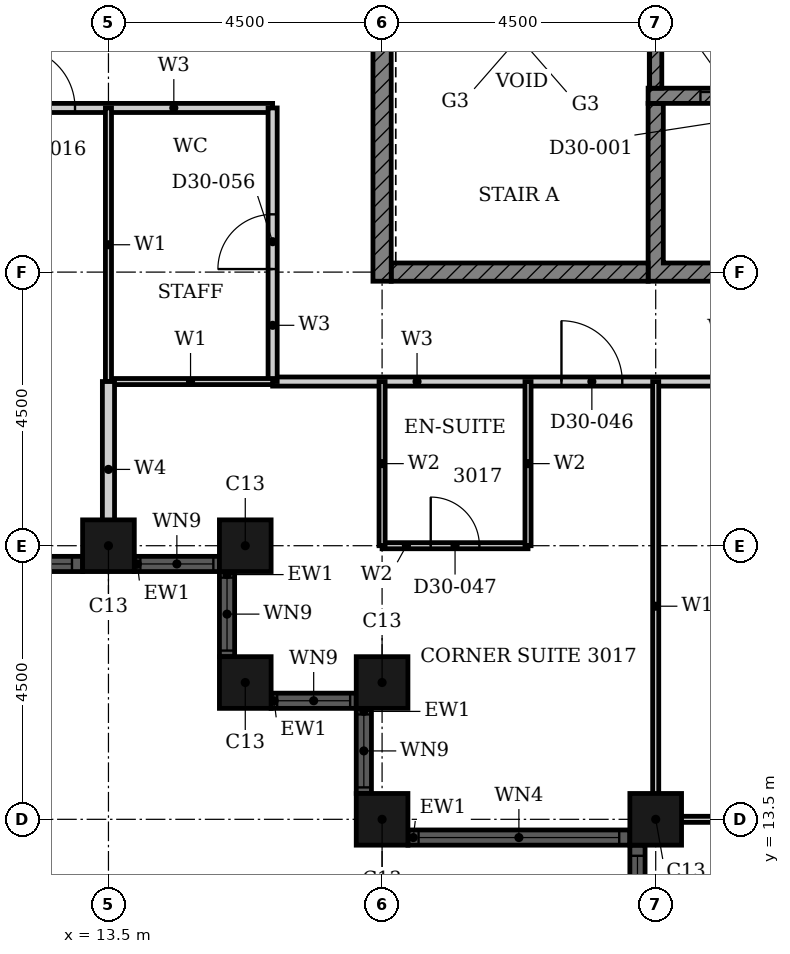
"""IFC4 building model, lengths in metres.
Left out: names, types, materials, properties, quantities, classifications, styles, units other than length and angle.
Written with IfcOpenShell. Run it as: python <this file> out.ifc"""

import sys

from ifc_helpers import new_model, si_unit, direction, frame, frame_2d, origin, origin_2d, place, context, subcontext, project, spatial, polyline, rectangle, hollow_rectangle, outline, extrude, element, fill, save


model = new_model("IFC4")
c1 = context("Model", 3, precision=1e-05, world=origin(), true_north=direction((0.0, 1.0)))
c2 = subcontext(c1, "Body", "Model", "MODEL_VIEW")
j1 = project(units=[si_unit("LENGTHUNIT", "METRE"), si_unit("PLANEANGLEUNIT", "RADIAN")], contexts=[c1])
p1 = place(None, origin())
s1 = spatial("IfcSite", under=j1, at=p1, CompositionType="ELEMENT")
p2 = place(p1, origin())
s2 = spatial("IfcBuilding", under=s1, at=p2, CompositionType="ELEMENT")
p3 = place(p2, frame((0.0, 0.0, 122.4)))
s3 = spatial("IfcBuildingStorey", under=s2, at=p3, CompositionType="ELEMENT", Elevation=122.4)
for number, where, z_axis, x_axis in (
    (1, (13.5, 18.0, 0.0), (0.0, 0.0, 1.0), (1.0, 0.0, 0.0)),
    (2, (15.75, 18.0, 0.0), (0.0, 0.0, 1.0), (1.0, 0.0, 0.0)),
    (3, (15.75, 15.75, 0.0), (0.0, 0.0, 1.0), (1.0, 0.0, 0.0)),
    (4, (18.0, 15.75, 0.0), (0.0, 0.0, 1.0), (1.0, 0.0, 0.0)),
    (5, (18.0, 13.5, 0.0), (0.0, 0.0, 1.0), (1.0, 0.0, 0.0)),
    (6, (22.5, 13.5, 0.0), (0.0, 0.0, 1.0), (1.0, 0.0, 0.0)),
):
    element("IfcColumn", number, at=place(p3, frame(where, z_axis=z_axis, x_axis=x_axis)), inside=s3, PredefinedType="COLUMN", context=c2, shape_type="SweptSolid", body=[
        extrude(hollow_rectangle(XDim=0.85, YDim=0.85, WallThickness=0.026, at=origin_2d()), origin(), (0.0, 0.0, 1.0), 3.6),
    ])
p4 = place(p3, frame((4.925, 17.7, 0.0), z_axis=(0.0, 0.0, 1.0), x_axis=(1.0, 0.0, 0.0)))
e7 = element("IfcWall", 7, at=p4, inside=s3, PredefinedType="SOLIDWALL", context=c2, shape_type="SweptSolid", body=[
    extrude(rectangle(XDim=8.15, YDim=0.25, at=frame_2d((4.075, 0.0))), origin(), (0.0, 0.0, 1.0), 3.6),
])
p5 = place(p4, frame((0.175, 0.0, 0.9)))
e8 = element("IfcOpeningElement", 8, at=p5, cuts=e7, PredefinedType="OPENING", context=c2, shape_type="SweptSolid", body=[
    extrude(rectangle(XDim=3.3, YDim=2.08, at=frame_2d((1.65, 1.04))), frame((0.0, 0.135, 0.0), z_axis=(0.0, -1.0, 0.0), x_axis=(1.0, 0.0, 0.0)), (0.0, 0.0, 1.0), 0.27),
])
p6 = place(p4, frame((4.675, 0.0, 0.9)))
e9 = element("IfcOpeningElement", 9, at=p6, cuts=e7, PredefinedType="OPENING", context=c2, shape_type="SweptSolid", body=[
    extrude(rectangle(XDim=3.3, YDim=2.08, at=frame_2d((1.65, 1.04))), frame((0.0, 0.135, 0.0), z_axis=(0.0, -1.0, 0.0), x_axis=(1.0, 0.0, 0.0)), (0.0, 0.0, 1.0), 0.27),
])
p7 = place(p3, frame((13.925, 17.7, 0.0), z_axis=(0.0, 0.0, 1.0), x_axis=(1.0, 0.0, 0.0)))
e10 = element("IfcWall", 10, at=p7, inside=s3, PredefinedType="SOLIDWALL", context=c2, shape_type="SweptSolid", body=[
    extrude(rectangle(XDim=1.4, YDim=0.25, at=frame_2d((0.7, 0.0))), origin(), (0.0, 0.0, 1.0), 3.6),
])
p8 = place(p7, frame((0.1, 0.0, 0.9)))
e11 = element("IfcOpeningElement", 11, at=p8, cuts=e10, PredefinedType="OPENING", context=c2, shape_type="SweptSolid", body=[
    extrude(rectangle(XDim=1.2, YDim=2.08, at=frame_2d((0.6, 1.04))), frame((0.0, 0.135, 0.0), z_axis=(0.0, -1.0, 0.0), x_axis=(1.0, 0.0, 0.0)), (0.0, 0.0, 1.0), 0.27),
])
p9 = place(p3, frame((15.45, 17.575, 0.0), z_axis=(0.0, 0.0, 1.0), x_axis=(0.0, -1.0, 0.0)))
e12 = element("IfcWall", 12, at=p9, inside=s3, PredefinedType="SOLIDWALL", context=c2, shape_type="SweptSolid", body=[
    extrude(rectangle(XDim=1.4, YDim=0.25, at=frame_2d((0.7, 0.0))), origin(), (0.0, 0.0, 1.0), 3.6),
])
p10 = place(p9, frame((0.1, 0.0, 0.9)))
e13 = element("IfcOpeningElement", 13, at=p10, cuts=e12, PredefinedType="OPENING", context=c2, shape_type="SweptSolid", body=[
    extrude(rectangle(XDim=1.2, YDim=2.08, at=frame_2d((0.6, 1.04))), frame((0.0, 0.135, 0.0), z_axis=(0.0, -1.0, 0.0), x_axis=(1.0, 0.0, 0.0)), (0.0, 0.0, 1.0), 0.27),
])
p11 = place(p3, frame((16.175, 15.45, 0.0), z_axis=(0.0, 0.0, 1.0), x_axis=(1.0, 0.0, 0.0)))
e14 = element("IfcWall", 14, at=p11, inside=s3, PredefinedType="SOLIDWALL", context=c2, shape_type="SweptSolid", body=[
    extrude(rectangle(XDim=1.4, YDim=0.25, at=frame_2d((0.7, 0.0))), origin(), (0.0, 0.0, 1.0), 3.6),
])
p12 = place(p11, frame((0.1, 0.0, 0.9)))
e15 = element("IfcOpeningElement", 15, at=p12, cuts=e14, PredefinedType="OPENING", context=c2, shape_type="SweptSolid", body=[
    extrude(rectangle(XDim=1.2, YDim=2.08, at=frame_2d((0.6, 1.04))), frame((0.0, 0.135, 0.0), z_axis=(0.0, -1.0, 0.0), x_axis=(1.0, 0.0, 0.0)), (0.0, 0.0, 1.0), 0.27),
])
p13 = place(p3, frame((17.7, 15.325, 0.0), z_axis=(0.0, 0.0, 1.0), x_axis=(0.0, -1.0, 0.0)))
e16 = element("IfcWall", 16, at=p13, inside=s3, PredefinedType="SOLIDWALL", context=c2, shape_type="SweptSolid", body=[
    extrude(rectangle(XDim=1.4, YDim=0.25, at=frame_2d((0.7, 0.0))), origin(), (0.0, 0.0, 1.0), 3.6),
])
p14 = place(p13, frame((0.1, 0.0, 0.9)))
e17 = element("IfcOpeningElement", 17, at=p14, cuts=e16, PredefinedType="OPENING", context=c2, shape_type="SweptSolid", body=[
    extrude(rectangle(XDim=1.2, YDim=2.08, at=frame_2d((0.6, 1.04))), frame((0.0, 0.135, 0.0), z_axis=(0.0, -1.0, 0.0), x_axis=(1.0, 0.0, 0.0)), (0.0, 0.0, 1.0), 0.27),
])
p15 = place(p3, frame((18.425, 13.2, 0.0), z_axis=(0.0, 0.0, 1.0), x_axis=(1.0, 0.0, 0.0)))
e18 = element("IfcWall", 18, at=p15, inside=s3, PredefinedType="SOLIDWALL", context=c2, shape_type="SweptSolid", body=[
    extrude(rectangle(XDim=3.65, YDim=0.25, at=frame_2d((1.825, 0.0))), origin(), (0.0, 0.0, 1.0), 3.6),
])
p16 = place(p15, frame((0.175, 0.0, 0.9)))
e19 = element("IfcOpeningElement", 19, at=p16, cuts=e18, PredefinedType="OPENING", context=c2, shape_type="SweptSolid", body=[
    extrude(rectangle(XDim=3.3, YDim=2.08, at=frame_2d((1.65, 1.04))), frame((0.0, 0.135, 0.0), z_axis=(0.0, -1.0, 0.0), x_axis=(1.0, 0.0, 0.0)), (0.0, 0.0, 1.0), 0.27),
])
p17 = place(p3, frame((22.2, 13.075, 0.0), z_axis=(0.0, 0.0, 1.0), x_axis=(0.0, -1.0, 0.0)))
e20 = element("IfcWall", 20, at=p17, inside=s3, PredefinedType="SOLIDWALL", context=c2, shape_type="SweptSolid", body=[
    extrude(rectangle(XDim=8.15, YDim=0.25, at=frame_2d((4.075, 0.0))), origin(), (0.0, 0.0, 1.0), 3.6),
])
p18 = place(p17, frame((0.175, 0.0, 0.9)))
e21 = element("IfcOpeningElement", 21, at=p18, cuts=e20, PredefinedType="OPENING", context=c2, shape_type="SweptSolid", body=[
    extrude(rectangle(XDim=3.3, YDim=2.08, at=frame_2d((1.65, 1.04))), frame((0.0, 0.135, 0.0), z_axis=(0.0, -1.0, 0.0), x_axis=(1.0, 0.0, 0.0)), (0.0, 0.0, 1.0), 0.27),
])
p19 = place(p17, frame((4.675, 0.0, 0.9)))
e22 = element("IfcOpeningElement", 22, at=p19, cuts=e20, PredefinedType="OPENING", context=c2, shape_type="SweptSolid", body=[
    extrude(rectangle(XDim=3.3, YDim=2.08, at=frame_2d((1.65, 1.04))), frame((0.0, 0.135, 0.0), z_axis=(0.0, -1.0, 0.0), x_axis=(1.0, 0.0, 0.0)), (0.0, 0.0, 1.0), 0.27),
])
p20 = place(p3, origin())
e23 = element("IfcWall", 23, at=p20, inside=s3, PredefinedType="SHEAR", context=c2, shape_type="SweptSolid", body=[
    extrude(outline(polyline([(22.375, 22.35), (38.053, 22.35), (38.053, 25.275), (37.803, 25.275), (37.803, 22.65), (35.482, 22.65), (35.482, 25.275), (35.232, 25.275), (35.232, 22.65), (32.911, 22.65), (32.911, 25.275), (32.661, 25.275), (32.661, 22.65), (30.339, 22.65), (30.339, 25.275), (30.089, 25.275), (30.089, 22.65), (27.768, 22.65), (27.768, 25.275), (27.518, 25.275), (27.518, 22.65), (25.197, 22.65), (25.197, 25.275), (24.947, 25.275), (24.947, 22.65), (22.625, 22.65), (22.625, 25.275), (22.375, 25.275), (22.375, 22.35)])), origin(), (0.0, 0.0, 1.0), 3.3),
])
p21 = place(p3, frame((18.15, 22.5, 0.0), z_axis=(0.0, 0.0, 1.0), x_axis=(1.0, 0.0, 0.0)))
e24 = element("IfcWall", 24, at=p21, inside=s3, PredefinedType="SHEAR", context=c2, shape_type="SweptSolid", body=[
    extrude(rectangle(XDim=4.225, YDim=0.3, at=frame_2d((2.113, 0.0))), origin(), (0.0, 0.0, 1.0), 3.3),
])
p22 = place(p3, frame((18.0, 22.35, 0.0), z_axis=(0.0, 0.0, 1.0), x_axis=(0.0, 1.0, 0.0)))
e25 = element("IfcWall", 25, at=p22, inside=s3, PredefinedType="SHEAR", context=c2, shape_type="SweptSolid", body=[
    extrude(rectangle(XDim=9.3, YDim=0.3, at=frame_2d((4.65, 0.0))), origin(), (0.0, 0.0, 1.0), 3.3),
])
p23 = place(p3, frame((22.375, 25.4, 0.0), z_axis=(0.0, 0.0, 1.0), x_axis=(1.0, 0.0, 0.0)))
e26 = element("IfcWall", 26, at=p23, inside=s3, PredefinedType="SHEAR", context=c2, shape_type="SweptSolid", body=[
    extrude(rectangle(XDim=15.678, YDim=0.25, at=frame_2d((7.839, 0.0))), origin(), (0.0, 0.0, 1.0), 3.3),
])
p24 = place(p23, frame((3.432, 0.0, 0.0)))
e27 = element("IfcOpeningElement", 27, at=p24, cuts=e26, PredefinedType="OPENING", context=c2, shape_type="SweptSolid", body=[
    extrude(rectangle(XDim=1.1, YDim=2.1, at=frame_2d((0.55, 1.05))), frame((0.0, 0.135, 0.0), z_axis=(0.0, -1.0, 0.0), x_axis=(1.0, 0.0, 0.0)), (0.0, 0.0, 1.0), 0.27),
])
p25 = place(p23, frame((11.146, 0.0, 0.0)))
e28 = element("IfcOpeningElement", 28, at=p25, cuts=e26, PredefinedType="OPENING", context=c2, shape_type="SweptSolid", body=[
    extrude(rectangle(XDim=1.1, YDim=2.1, at=frame_2d((0.55, 1.05))), frame((0.0, 0.135, 0.0), z_axis=(0.0, -1.0, 0.0), x_axis=(1.0, 0.0, 0.0)), (0.0, 0.0, 1.0), 0.27),
])
p26 = place(p23, frame((13.718, 0.0, 0.0)))
e29 = element("IfcOpeningElement", 29, at=p26, cuts=e26, PredefinedType="OPENING", context=c2, shape_type="SweptSolid", body=[
    extrude(rectangle(XDim=1.1, YDim=2.1, at=frame_2d((0.55, 1.05))), frame((0.0, 0.135, 0.0), z_axis=(0.0, -1.0, 0.0), x_axis=(1.0, 0.0, 0.0)), (0.0, 0.0, 1.0), 0.27),
])
p27 = place(p23, frame((0.861, 0.0, 0.0)))
e30 = element("IfcOpeningElement", 30, at=p27, cuts=e26, PredefinedType="OPENING", context=c2, shape_type="SweptSolid", body=[
    extrude(rectangle(XDim=1.1, YDim=2.1, at=frame_2d((0.55, 1.05))), frame((0.0, 0.135, 0.0), z_axis=(0.0, -1.0, 0.0), x_axis=(1.0, 0.0, 0.0)), (0.0, 0.0, 1.0), 0.27),
])
p28 = place(p3, frame((22.5, 31.35, 0.0), z_axis=(0.0, 0.0, 1.0), x_axis=(0.0, -1.0, 0.0)))
e31 = element("IfcWall", 31, at=p28, inside=s3, PredefinedType="SHEAR", context=c2, shape_type="SweptSolid", body=[
    extrude(rectangle(XDim=5.825, YDim=0.2, at=frame_2d((2.913, 0.0))), origin(), (0.0, 0.0, 1.0), 3.3),
])
p29 = place(p28, frame((0.25, 0.0, 0.0)))
e32 = element("IfcOpeningElement", 32, at=p29, cuts=e31, PredefinedType="OPENING", context=c2, shape_type="SweptSolid", body=[
    extrude(rectangle(XDim=1.8, YDim=2.1, at=frame_2d((0.9, 1.05))), frame((0.0, 0.11, 0.0), z_axis=(0.0, -1.0, 0.0), x_axis=(1.0, 0.0, 0.0)), (0.0, 0.0, 1.0), 0.22),
])
p30 = place(p3, frame((16.2, 20.7, 0.0), z_axis=(0.0, 0.0, 1.0), x_axis=(1.0, 0.0, 0.0)))
e33 = element("IfcWall", 33, at=p30, inside=s3, PredefinedType="PARTITIONING", context=c2, shape_type="SweptSolid", body=[
    extrude(rectangle(XDim=13.5, YDim=0.15, at=frame_2d((6.75, 0.0))), origin(), (0.0, 0.0, 1.0), 3.3),
])
p31 = place(p30, frame((4.75, 0.0, 0.0)))
e34 = element("IfcOpeningElement", 34, at=p31, cuts=e33, PredefinedType="OPENING", context=c2, shape_type="SweptSolid", body=[
    extrude(rectangle(XDim=1.0, YDim=2.1, at=frame_2d((0.5, 1.05))), frame((0.0, 0.085, 0.0), z_axis=(0.0, -1.0, 0.0), x_axis=(1.0, 0.0, 0.0)), (0.0, 0.0, 1.0), 0.17),
])
p32 = place(p30, frame((9.45, 0.0, 0.0)))
e35 = element("IfcOpeningElement", 35, at=p32, cuts=e33, PredefinedType="OPENING", context=c2, shape_type="SweptSolid", body=[
    extrude(rectangle(XDim=0.9, YDim=2.1, at=frame_2d((0.45, 1.05))), frame((0.0, 0.085, 0.0), z_axis=(0.0, -1.0, 0.0), x_axis=(1.0, 0.0, 0.0)), (0.0, 0.0, 1.0), 0.17),
])
p33 = place(p3, frame((9.0, 25.2, 0.0), z_axis=(0.0, 0.0, 1.0), x_axis=(1.0, 0.0, 0.0)))
e36 = element("IfcWall", 36, at=p33, inside=s3, PredefinedType="PARTITIONING", context=c2, shape_type="SweptSolid", body=[
    extrude(rectangle(XDim=7.2, YDim=0.15, at=frame_2d((3.6, 0.0))), origin(), (0.0, 0.0, 1.0), 3.3),
])
p34 = place(p33, frame((2.95, 0.0, 0.0)))
e37 = element("IfcOpeningElement", 37, at=p34, cuts=e36, PredefinedType="OPENING", context=c2, shape_type="SweptSolid", body=[
    extrude(rectangle(XDim=1.0, YDim=2.1, at=frame_2d((0.5, 1.05))), frame((0.0, 0.085, 0.0), z_axis=(0.0, -1.0, 0.0), x_axis=(1.0, 0.0, 0.0)), (0.0, 0.0, 1.0), 0.17),
])
p35 = place(p3, frame((16.2, 20.7, 0.0), z_axis=(0.0, 0.0, 1.0), x_axis=(0.0, 1.0, 0.0)))
e38 = element("IfcWall", 38, at=p35, inside=s3, PredefinedType="PARTITIONING", context=c2, shape_type="SweptSolid", body=[
    extrude(rectangle(XDim=4.5, YDim=0.15, at=frame_2d((2.25, 0.0))), origin(), (0.0, 0.0, 1.0), 3.3),
])
p36 = place(p35, frame((1.85, 0.0, 0.0)))
e39 = element("IfcOpeningElement", 39, at=p36, cuts=e38, PredefinedType="OPENING", context=c2, shape_type="SweptSolid", body=[
    extrude(rectangle(XDim=0.9, YDim=2.1, at=frame_2d((0.45, 1.05))), frame((0.0, 0.085, 0.0), z_axis=(0.0, -1.0, 0.0), x_axis=(1.0, 0.0, 0.0)), (0.0, 0.0, 1.0), 0.17),
])
p37 = place(p3, frame((22.31, 13.5, 0.0), z_axis=(0.0, 0.0, 1.0), x_axis=(1.0, 0.0, 0.0)))
e40 = element("IfcWall", 40, at=p37, inside=s3, PredefinedType="PARTITIONING", context=c2, shape_type="SweptSolid", body=[
    extrude(rectangle(XDim=7.39, YDim=0.1, at=frame_2d((3.695, 0.0))), origin(), (0.0, 0.0, 1.0), 2.38),
])
p38 = place(p3, frame((13.5, 20.7, 0.0), z_axis=(0.0, 0.0, 1.0), x_axis=(1.0, 0.0, 0.0)))
e41 = element("IfcWall", 41, at=p38, inside=s3, PredefinedType="PARTITIONING", context=c2, shape_type="SweptSolid", body=[
    extrude(rectangle(XDim=2.7, YDim=0.1, at=frame_2d((1.35, 0.0))), origin(), (0.0, 0.0, 1.0), 3.3),
])
p39 = place(p3, frame((13.5, 20.7, 0.0), z_axis=(0.0, 0.0, 1.0), x_axis=(0.0, 1.0, 0.0)))
e42 = element("IfcWall", 42, at=p39, inside=s3, PredefinedType="PARTITIONING", context=c2, shape_type="SweptSolid", body=[
    extrude(rectangle(XDim=4.5, YDim=0.1, at=frame_2d((2.25, 0.0))), origin(), (0.0, 0.0, 1.0), 2.38),
])
p40 = place(p3, frame((22.5, 13.31, 0.0), z_axis=(0.0, 0.0, 1.0), x_axis=(0.0, 1.0, 0.0)))
e43 = element("IfcWall", 43, at=p40, inside=s3, PredefinedType="PARTITIONING", context=c2, shape_type="SweptSolid", body=[
    extrude(rectangle(XDim=7.39, YDim=0.1, at=frame_2d((3.695, 0.0))), origin(), (0.0, 0.0, 1.0), 3.3),
])
p41 = place(p3, frame((13.5, 17.81, 0.0), z_axis=(0.0, 0.0, 1.0), x_axis=(0.0, 1.0, 0.0)))
e44 = element("IfcWall", 44, at=p41, inside=s3, PredefinedType="PARTITIONING", context=c2, shape_type="SweptSolid", body=[
    extrude(rectangle(XDim=2.89, YDim=0.2, at=frame_2d((1.445, 0.0))), origin(), (0.0, 0.0, 1.0), 2.38),
])
p42 = place(p3, frame((18.0, 18.0, 0.0), z_axis=(0.0, 0.0, 1.0), x_axis=(1.0, 0.0, 0.0)))
e45 = element("IfcWall", 45, at=p42, inside=s3, PredefinedType="PARTITIONING", context=c2, shape_type="SweptSolid", body=[
    extrude(rectangle(XDim=2.4, YDim=0.1, at=frame_2d((1.2, 0.0))), origin(), (0.0, 0.0, 1.0), 3.3),
])
p43 = place(p42, frame((0.8, 0.0, 0.0)))
e46 = element("IfcOpeningElement", 46, at=p43, cuts=e45, PredefinedType="OPENING", context=c2, shape_type="SweptSolid", body=[
    extrude(rectangle(XDim=0.8, YDim=2.1, at=frame_2d((0.4, 1.05))), frame((0.0, 0.06, 0.0), z_axis=(0.0, -1.0, 0.0), x_axis=(1.0, 0.0, 0.0)), (0.0, 0.0, 1.0), 0.12),
])
for number, where, z_axis, x_axis in (
    (47, (18.0, 18.0, 0.0), (0.0, 0.0, 1.0), (0.0, 1.0, 0.0)),
    (48, (20.4, 18.0, 0.0), (0.0, 0.0, 1.0), (0.0, 1.0, 0.0)),
):
    element("IfcWall", number, at=place(p3, frame(where, z_axis=z_axis, x_axis=x_axis)), inside=s3, PredefinedType="PARTITIONING", context=c2, shape_type="SweptSolid", body=[
        extrude(rectangle(XDim=2.7, YDim=0.1, at=frame_2d((1.35, 0.0))), origin(), (0.0, 0.0, 1.0), 3.3),
    ])
p44 = place(p6, origin())
e49 = element("IfcWindow", 49, at=p44, inside=s3, PartitioningType="SINGLE_PANEL", PredefinedType="WINDOW", context=c2, shape_type="SweptSolid", body=[
    extrude(rectangle(XDim=3.3, YDim=2.08, at=frame_2d((1.65, 1.04))), frame((0.0, 0.03, 0.0), z_axis=(0.0, -1.0, 0.0), x_axis=(1.0, 0.0, 0.0)), (0.0, 0.0, 1.0), 0.06),
])
fill(e9, e49)
p45 = place(p8, origin())
e50 = element("IfcWindow", 50, at=p45, inside=s3, PartitioningType="SINGLE_PANEL", PredefinedType="WINDOW", context=c2, shape_type="SweptSolid", body=[
    extrude(rectangle(XDim=1.2, YDim=2.08, at=frame_2d((0.6, 1.04))), frame((0.0, 0.03, 0.0), z_axis=(0.0, -1.0, 0.0), x_axis=(1.0, 0.0, 0.0)), (0.0, 0.0, 1.0), 0.06),
])
fill(e11, e50)
p46 = place(p10, origin())
e51 = element("IfcWindow", 51, at=p46, inside=s3, PartitioningType="SINGLE_PANEL", PredefinedType="WINDOW", context=c2, shape_type="SweptSolid", body=[
    extrude(rectangle(XDim=1.2, YDim=2.08, at=frame_2d((0.6, 1.04))), frame((0.0, 0.03, 0.0), z_axis=(0.0, -1.0, 0.0), x_axis=(1.0, 0.0, 0.0)), (0.0, 0.0, 1.0), 0.06),
])
fill(e13, e51)
p47 = place(p12, origin())
e52 = element("IfcWindow", 52, at=p47, inside=s3, PartitioningType="SINGLE_PANEL", PredefinedType="WINDOW", context=c2, shape_type="SweptSolid", body=[
    extrude(rectangle(XDim=1.2, YDim=2.08, at=frame_2d((0.6, 1.04))), frame((0.0, 0.03, 0.0), z_axis=(0.0, -1.0, 0.0), x_axis=(1.0, 0.0, 0.0)), (0.0, 0.0, 1.0), 0.06),
])
fill(e15, e52)
p48 = place(p14, origin())
e53 = element("IfcWindow", 53, at=p48, inside=s3, PartitioningType="SINGLE_PANEL", PredefinedType="WINDOW", context=c2, shape_type="SweptSolid", body=[
    extrude(rectangle(XDim=1.2, YDim=2.08, at=frame_2d((0.6, 1.04))), frame((0.0, 0.03, 0.0), z_axis=(0.0, -1.0, 0.0), x_axis=(1.0, 0.0, 0.0)), (0.0, 0.0, 1.0), 0.06),
])
fill(e17, e53)
p49 = place(p16, origin())
e54 = element("IfcWindow", 54, at=p49, inside=s3, PartitioningType="SINGLE_PANEL", PredefinedType="WINDOW", context=c2, shape_type="SweptSolid", body=[
    extrude(rectangle(XDim=3.3, YDim=2.08, at=frame_2d((1.65, 1.04))), frame((0.0, 0.03, 0.0), z_axis=(0.0, -1.0, 0.0), x_axis=(1.0, 0.0, 0.0)), (0.0, 0.0, 1.0), 0.06),
])
fill(e19, e54)
p50 = place(p18, origin())
e55 = element("IfcWindow", 55, at=p50, inside=s3, PartitioningType="SINGLE_PANEL", PredefinedType="WINDOW", context=c2, shape_type="SweptSolid", body=[
    extrude(rectangle(XDim=3.3, YDim=2.08, at=frame_2d((1.65, 1.04))), frame((0.0, 0.03, 0.0), z_axis=(0.0, -1.0, 0.0), x_axis=(1.0, 0.0, 0.0)), (0.0, 0.0, 1.0), 0.06),
])
fill(e21, e55)
p51 = place(p27, origin())
e56 = element("IfcDoor", 56, at=p51, inside=s3, OperationType="DOUBLE_DOOR_SLIDING", PredefinedType="DOOR", context=c2, shape_type="SweptSolid", body=[
    extrude(rectangle(XDim=1.1, YDim=2.1, at=frame_2d((0.55, 1.05))), frame((0.0, 0.025, 0.0), z_axis=(0.0, -1.0, 0.0), x_axis=(1.0, 0.0, 0.0)), (0.0, 0.0, 1.0), 0.05),
])
fill(e30, e56)
p52 = place(p34, origin())
e57 = element("IfcDoor", 57, at=p52, inside=s3, OperationType="SINGLE_SWING_RIGHT", PredefinedType="DOOR", context=c2, shape_type="SweptSolid", body=[
    extrude(rectangle(XDim=1.0, YDim=2.1, at=frame_2d((0.5, 1.05))), frame((0.0, 0.025, 0.0), z_axis=(0.0, -1.0, 0.0), x_axis=(1.0, 0.0, 0.0)), (0.0, 0.0, 1.0), 0.05),
])
fill(e37, e57)
p53 = place(p31, origin())
e58 = element("IfcDoor", 58, at=p53, inside=s3, OperationType="SINGLE_SWING_RIGHT", PredefinedType="DOOR", context=c2, shape_type="SweptSolid", body=[
    extrude(rectangle(XDim=1.0, YDim=2.1, at=frame_2d((0.5, 1.05))), frame((0.0, 0.025, 0.0), z_axis=(0.0, -1.0, 0.0), x_axis=(1.0, 0.0, 0.0)), (0.0, 0.0, 1.0), 0.05),
])
fill(e34, e58)
p54 = place(p43, origin())
e59 = element("IfcDoor", 59, at=p54, inside=s3, OperationType="SINGLE_SWING_LEFT", PredefinedType="DOOR", context=c2, shape_type="SweptSolid", body=[
    extrude(rectangle(XDim=0.8, YDim=2.1, at=frame_2d((0.4, 1.05))), frame((0.0, 0.025, 0.0), z_axis=(0.0, -1.0, 0.0), x_axis=(1.0, 0.0, 0.0)), (0.0, 0.0, 1.0), 0.05),
])
fill(e46, e59)
p55 = place(p36, origin())
e60 = element("IfcDoor", 60, at=p55, inside=s3, OperationType="SINGLE_SWING_LEFT", PredefinedType="DOOR", context=c2, shape_type="SweptSolid", body=[
    extrude(rectangle(XDim=0.9, YDim=2.1, at=frame_2d((0.45, 1.05))), frame((0.0, 0.025, 0.0), z_axis=(0.0, -1.0, 0.0), x_axis=(1.0, 0.0, 0.0)), (0.0, 0.0, 1.0), 0.05),
])
fill(e39, e60)
save(model, sys.argv[1])
